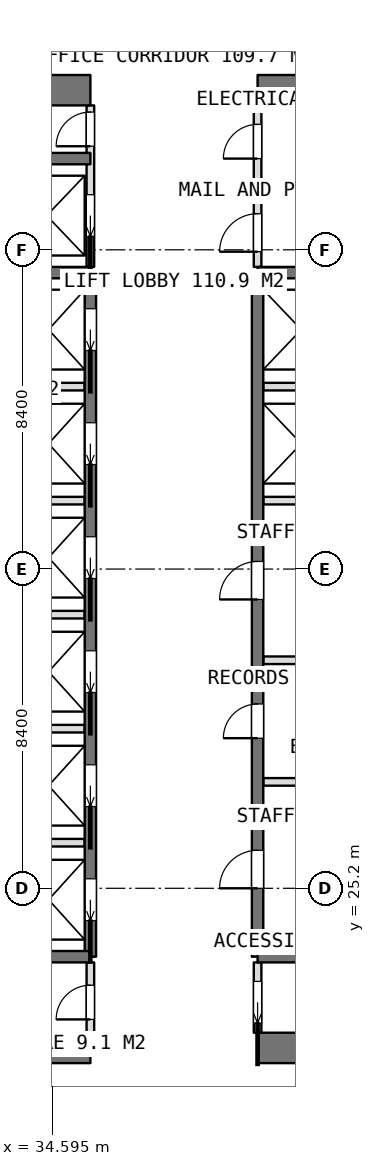
"""IFC4 building model, lengths in metres.
Left out: names, types, materials, properties, quantities, classifications, styles, units other than length and angle.
Written with IfcOpenShell. Run it as: python <this file> out.ifc"""

import sys

from ifc_helpers import new_model, si_unit, direction, frame, frame_2d, origin, place, context, subcontext, project, spatial, rectangle, extrude, element, fill, save


model = new_model("IFC4")
c1 = context("Model", 3, precision=1e-05, world=origin(), true_north=direction((0.0, 1.0)))
c2 = subcontext(c1, "Body", "Model", "MODEL_VIEW")
j1 = project(units=[si_unit("LENGTHUNIT", "METRE"), si_unit("PLANEANGLEUNIT", "RADIAN")], contexts=[c1])
p1 = place(None, origin())
s1 = spatial("IfcSite", under=j1, at=p1, CompositionType="ELEMENT")
p2 = place(p1, origin())
s2 = spatial("IfcBuilding", under=s1, at=p2, CompositionType="ELEMENT")
p3 = place(p2, frame((0.0, 0.0, 261.35)))
s3 = spatial("IfcBuildingStorey", under=s2, at=p3, CompositionType="ELEMENT", Elevation=261.35)
p4 = place(p3, frame((25.2, 21.0, 0.0), z_axis=(0.0, 0.0, 1.0), x_axis=(1.0, 0.0, 0.0)))
e1 = element("IfcWall", 1, at=p4, inside=s3, PredefinedType="SHEAR", context=c2, shape_type="SweptSolid", body=[
    extrude(rectangle(XDim=10.4, YDim=0.8, at=frame_2d((5.2, 0.0))), origin(), (0.0, 0.0, 1.0), 3.75),
])
p5 = place(p3, frame((40.0, 21.0, 0.0), z_axis=(0.0, 0.0, 1.0), x_axis=(1.0, 0.0, 0.0)))
e2 = element("IfcWall", 2, at=p5, inside=s3, PredefinedType="SHEAR", context=c2, shape_type="SweptSolid", body=[
    extrude(rectangle(XDim=10.4, YDim=0.8, at=frame_2d((5.2, 0.0))), origin(), (0.0, 0.0, 1.0), 3.75),
])
p6 = place(p3, frame((25.2, 46.2, 0.0), z_axis=(0.0, 0.0, 1.0), x_axis=(1.0, 0.0, 0.0)))
e3 = element("IfcWall", 3, at=p6, inside=s3, PredefinedType="SHEAR", context=c2, shape_type="SweptSolid", body=[
    extrude(rectangle(XDim=10.4, YDim=0.8, at=frame_2d((5.2, 0.0))), origin(), (0.0, 0.0, 1.0), 3.75),
])
p7 = place(p3, frame((40.0, 46.2, 0.0), z_axis=(0.0, 0.0, 1.0), x_axis=(1.0, 0.0, 0.0)))
e4 = element("IfcWall", 4, at=p7, inside=s3, PredefinedType="SHEAR", context=c2, shape_type="SweptSolid", body=[
    extrude(rectangle(XDim=10.4, YDim=0.8, at=frame_2d((5.2, 0.0))), origin(), (0.0, 0.0, 1.0), 3.75),
])
p8 = place(p3, frame((35.6, 23.4, 0.0), z_axis=(0.0, 0.0, 1.0), x_axis=(0.0, 1.0, 0.0)))
e5 = element("IfcWall", 5, at=p8, inside=s3, PredefinedType="SHEAR", context=c2, shape_type="SweptSolid", body=[
    extrude(rectangle(XDim=18.0, YDim=0.3, at=frame_2d((9.0, 0.0))), origin(), (0.0, 0.0, 1.0), 3.75),
])
p9 = place(p8, frame((0.95, 0.0, 0.0)))
e6 = element("IfcOpeningElement", 6, at=p9, cuts=e5, PredefinedType="OPENING", context=c2, shape_type="SweptSolid", body=[
    extrude(rectangle(XDim=1.1, YDim=2.1, at=frame_2d((0.55, 1.05))), frame((0.0, 0.16, 0.0), z_axis=(0.0, -1.0, 0.0), x_axis=(1.0, 0.0, 0.0)), (0.0, 0.0, 1.0), 0.32),
])
p10 = place(p8, frame((3.95, 0.0, 0.0)))
e7 = element("IfcOpeningElement", 7, at=p10, cuts=e5, PredefinedType="OPENING", context=c2, shape_type="SweptSolid", body=[
    extrude(rectangle(XDim=1.1, YDim=2.1, at=frame_2d((0.55, 1.05))), frame((0.0, 0.16, 0.0), z_axis=(0.0, -1.0, 0.0), x_axis=(1.0, 0.0, 0.0)), (0.0, 0.0, 1.0), 0.32),
])
p11 = place(p8, frame((6.95, 0.0, 0.0)))
e8 = element("IfcOpeningElement", 8, at=p11, cuts=e5, PredefinedType="OPENING", context=c2, shape_type="SweptSolid", body=[
    extrude(rectangle(XDim=1.1, YDim=2.1, at=frame_2d((0.55, 1.05))), frame((0.0, 0.16, 0.0), z_axis=(0.0, -1.0, 0.0), x_axis=(1.0, 0.0, 0.0)), (0.0, 0.0, 1.0), 0.32),
])
p12 = place(p8, frame((9.95, 0.0, 0.0)))
e9 = element("IfcOpeningElement", 9, at=p12, cuts=e5, PredefinedType="OPENING", context=c2, shape_type="SweptSolid", body=[
    extrude(rectangle(XDim=1.1, YDim=2.1, at=frame_2d((0.55, 1.05))), frame((0.0, 0.16, 0.0), z_axis=(0.0, -1.0, 0.0), x_axis=(1.0, 0.0, 0.0)), (0.0, 0.0, 1.0), 0.32),
])
p13 = place(p8, frame((12.95, 0.0, 0.0)))
e10 = element("IfcOpeningElement", 10, at=p13, cuts=e5, PredefinedType="OPENING", context=c2, shape_type="SweptSolid", body=[
    extrude(rectangle(XDim=1.1, YDim=2.1, at=frame_2d((0.55, 1.05))), frame((0.0, 0.16, 0.0), z_axis=(0.0, -1.0, 0.0), x_axis=(1.0, 0.0, 0.0)), (0.0, 0.0, 1.0), 0.32),
])
p14 = place(p8, frame((15.95, 0.0, 0.0)))
e11 = element("IfcOpeningElement", 11, at=p14, cuts=e5, PredefinedType="OPENING", context=c2, shape_type="SweptSolid", body=[
    extrude(rectangle(XDim=1.1, YDim=2.1, at=frame_2d((0.55, 1.05))), frame((0.0, 0.16, 0.0), z_axis=(0.0, -1.0, 0.0), x_axis=(1.0, 0.0, 0.0)), (0.0, 0.0, 1.0), 0.32),
])
p15 = place(p3, frame((40.0, 23.4, 0.0), z_axis=(0.0, 0.0, 1.0), x_axis=(0.0, 1.0, 0.0)))
e12 = element("IfcWall", 12, at=p15, inside=s3, PredefinedType="SHEAR", context=c2, shape_type="SweptSolid", body=[
    extrude(rectangle(XDim=18.0, YDim=0.3, at=frame_2d((9.0, 0.0))), origin(), (0.0, 0.0, 1.0), 3.75),
])
p16 = place(p15, frame((1.8, 0.0, 0.0)))
e13 = element("IfcOpeningElement", 13, at=p16, cuts=e12, PredefinedType="OPENING", context=c2, shape_type="SweptSolid", body=[
    extrude(rectangle(XDim=1.0, YDim=2.1, at=frame_2d((0.5, 1.05))), frame((0.0, 0.16, 0.0), z_axis=(0.0, -1.0, 0.0), x_axis=(1.0, 0.0, 0.0)), (0.0, 0.0, 1.0), 0.32),
])
p17 = place(p15, frame((5.75, 0.0, 0.0)))
e14 = element("IfcOpeningElement", 14, at=p17, cuts=e12, PredefinedType="OPENING", context=c2, shape_type="SweptSolid", body=[
    extrude(rectangle(XDim=0.9, YDim=2.1, at=frame_2d((0.45, 1.05))), frame((0.0, 0.16, 0.0), z_axis=(0.0, -1.0, 0.0), x_axis=(1.0, 0.0, 0.0)), (0.0, 0.0, 1.0), 0.32),
])
p18 = place(p15, frame((9.4, 0.0, 0.0)))
e15 = element("IfcOpeningElement", 15, at=p18, cuts=e12, PredefinedType="OPENING", context=c2, shape_type="SweptSolid", body=[
    extrude(rectangle(XDim=1.0, YDim=2.1, at=frame_2d((0.5, 1.05))), frame((0.0, 0.16, 0.0), z_axis=(0.0, -1.0, 0.0), x_axis=(1.0, 0.0, 0.0)), (0.0, 0.0, 1.0), 0.32),
])
for number, where, z_axis, x_axis in (
    (16, (31.8, 23.4, 0.0), (0.0, 0.0, 1.0), (1.0, 0.0, 0.0)),
    (17, (31.8, 41.4, 0.0), (0.0, 0.0, 1.0), (1.0, 0.0, 0.0)),
    (18, (31.8, 44.4, 0.0), (0.0, 0.0, 1.0), (1.0, 0.0, 0.0)),
    (19, (40.0, 23.4, 0.0), (0.0, 0.0, 1.0), (1.0, 0.0, 0.0)),
    (20, (40.0, 41.4, 0.0), (0.0, 0.0, 1.0), (1.0, 0.0, 0.0)),
):
    element("IfcWall", number, at=place(p3, frame(where, z_axis=z_axis, x_axis=x_axis)), inside=s3, PredefinedType="SHEAR", context=c2, shape_type="SweptSolid", body=[
        extrude(rectangle(XDim=3.8, YDim=0.3, at=frame_2d((1.9, 0.0))), origin(), (0.0, 0.0, 1.0), 3.75),
    ])
for number, where, z_axis, x_axis in (
    (21, (31.95, 26.4, 0.0), (0.0, 0.0, 1.0), (1.0, 0.0, 0.0)),
    (22, (31.95, 29.4, 0.0), (0.0, 0.0, 1.0), (1.0, 0.0, 0.0)),
    (23, (31.95, 32.4, 0.0), (0.0, 0.0, 1.0), (1.0, 0.0, 0.0)),
    (24, (31.95, 35.4, 0.0), (0.0, 0.0, 1.0), (1.0, 0.0, 0.0)),
    (25, (31.95, 38.4, 0.0), (0.0, 0.0, 1.0), (1.0, 0.0, 0.0)),
    (26, (40.15, 35.4, 0.0), (0.0, 0.0, 1.0), (1.0, 0.0, 0.0)),
    (27, (40.15, 38.4, 0.0), (0.0, 0.0, 1.0), (1.0, 0.0, 0.0)),
):
    element("IfcWall", number, at=place(p3, frame(where, z_axis=z_axis, x_axis=x_axis)), inside=s3, PredefinedType="PARTITIONING", context=c2, shape_type="SweptSolid", body=[
        extrude(rectangle(XDim=3.5, YDim=0.2, at=frame_2d((1.75, 0.0))), origin(), (0.0, 0.0, 1.0), 3.5),
    ])
p19 = place(p3, frame((40.0, 21.4, 0.0), z_axis=(0.0, 0.0, 1.0), x_axis=(0.0, 1.0, 0.0)))
e28 = element("IfcWall", 28, at=p19, inside=s3, PredefinedType="PARTITIONING", context=c2, shape_type="SweptSolid", body=[
    extrude(rectangle(XDim=1.85, YDim=0.2, at=frame_2d((0.925, 0.0))), origin(), (0.0, 0.0, 1.0), 3.5),
])
p20 = place(p19, frame((0.25, 0.0, 0.0)))
e29 = element("IfcOpeningElement", 29, at=p20, cuts=e28, PredefinedType="OPENING", context=c2, shape_type="SweptSolid", body=[
    extrude(rectangle(XDim=1.1, YDim=2.1, at=frame_2d((0.55, 1.05))), frame((0.0, 0.11, 0.0), z_axis=(0.0, -1.0, 0.0), x_axis=(1.0, 0.0, 0.0)), (0.0, 0.0, 1.0), 0.22),
])
p21 = place(p3, frame((40.0, 41.55, 0.0), z_axis=(0.0, 0.0, 1.0), x_axis=(0.0, 1.0, 0.0)))
e30 = element("IfcWall", 30, at=p21, inside=s3, PredefinedType="PARTITIONING", context=c2, shape_type="SweptSolid", body=[
    extrude(rectangle(XDim=4.25, YDim=0.2, at=frame_2d((2.125, 0.0))), origin(), (0.0, 0.0, 1.0), 3.5),
])
p22 = place(p21, frame((2.85, 0.0, 0.0)))
e31 = element("IfcOpeningElement", 31, at=p22, cuts=e30, PredefinedType="OPENING", context=c2, shape_type="SweptSolid", body=[
    extrude(rectangle(XDim=0.9, YDim=2.1, at=frame_2d((0.45, 1.05))), frame((0.0, 0.11, 0.0), z_axis=(0.0, -1.0, 0.0), x_axis=(1.0, 0.0, 0.0)), (0.0, 0.0, 1.0), 0.22),
])
p23 = place(p21, frame((0.4, 0.0, 0.0)))
e32 = element("IfcOpeningElement", 32, at=p23, cuts=e30, PredefinedType="OPENING", context=c2, shape_type="SweptSolid", body=[
    extrude(rectangle(XDim=1.0, YDim=2.1, at=frame_2d((0.5, 1.05))), frame((0.0, 0.11, 0.0), z_axis=(0.0, -1.0, 0.0), x_axis=(1.0, 0.0, 0.0)), (0.0, 0.0, 1.0), 0.22),
])
p24 = place(p3, frame((35.6, 41.55, 0.0), z_axis=(0.0, 0.0, 1.0), x_axis=(0.0, 1.0, 0.0)))
e33 = element("IfcWall", 33, at=p24, inside=s3, PredefinedType="PARTITIONING", context=c2, shape_type="SweptSolid", body=[
    extrude(rectangle(XDim=4.25, YDim=0.2, at=frame_2d((2.125, 0.0))), origin(), (0.0, 0.0, 1.0), 3.5),
])
p25 = place(p24, frame((3.175, 0.0, 0.0)))
e34 = element("IfcOpeningElement", 34, at=p25, cuts=e33, PredefinedType="OPENING", context=c2, shape_type="SweptSolid", body=[
    extrude(rectangle(XDim=0.9, YDim=2.1, at=frame_2d((0.45, 1.05))), frame((0.0, 0.11, 0.0), z_axis=(0.0, -1.0, 0.0), x_axis=(1.0, 0.0, 0.0)), (0.0, 0.0, 1.0), 0.22),
])
p26 = place(p24, frame((0.8, 0.0, 0.0)))
e35 = element("IfcOpeningElement", 35, at=p26, cuts=e33, PredefinedType="OPENING", context=c2, shape_type="SweptSolid", body=[
    extrude(rectangle(XDim=1.1, YDim=2.1, at=frame_2d((0.55, 1.05))), frame((0.0, 0.11, 0.0), z_axis=(0.0, -1.0, 0.0), x_axis=(1.0, 0.0, 0.0)), (0.0, 0.0, 1.0), 0.22),
])
p27 = place(p3, frame((35.6, 21.4, 0.0), z_axis=(0.0, 0.0, 1.0), x_axis=(0.0, 1.0, 0.0)))
e36 = element("IfcWall", 36, at=p27, inside=s3, PredefinedType="PARTITIONING", context=c2, shape_type="SweptSolid", body=[
    extrude(rectangle(XDim=1.85, YDim=0.2, at=frame_2d((0.925, 0.0))), origin(), (0.0, 0.0, 1.0), 3.5),
])
p28 = place(p27, frame((0.35, 0.0, 0.0)))
e37 = element("IfcOpeningElement", 37, at=p28, cuts=e36, PredefinedType="OPENING", context=c2, shape_type="SweptSolid", body=[
    extrude(rectangle(XDim=0.9, YDim=2.1, at=frame_2d((0.45, 1.05))), frame((0.0, 0.11, 0.0), z_axis=(0.0, -1.0, 0.0), x_axis=(1.0, 0.0, 0.0)), (0.0, 0.0, 1.0), 0.22),
])
for number, where, z_axis, x_axis in (
    (38, (40.15, 28.0, 0.0), (0.0, 0.0, 1.0), (1.0, 0.0, 0.0)),
    (39, (40.15, 31.2, 0.0), (0.0, 0.0, 1.0), (1.0, 0.0, 0.0)),
):
    element("IfcWall", number, at=place(p3, frame(where, z_axis=z_axis, x_axis=x_axis)), inside=s3, PredefinedType="PARTITIONING", context=c2, shape_type="SweptSolid", body=[
        extrude(rectangle(XDim=3.5, YDim=0.2, at=frame_2d((1.75, 0.0))), origin(), (0.0, 0.0, 1.0), 3.5),
    ])
p29 = place(p3, frame((40.0, 43.5, 0.0), z_axis=(0.0, 0.0, 1.0), x_axis=(1.0, 0.0, 0.0)))
e40 = element("IfcWall", 40, at=p29, inside=s3, PredefinedType="PARTITIONING", context=c2, shape_type="SweptSolid", body=[
    extrude(rectangle(XDim=3.65, YDim=0.2, at=frame_2d((1.825, 0.0))), origin(), (0.0, 0.0, 1.0), 3.5),
])
p30 = place(p20, origin())
e41 = element("IfcDoor", 41, at=p30, inside=s3, OperationType="SLIDING_TO_LEFT", PredefinedType="DOOR", context=c2, shape_type="SweptSolid", body=[
    extrude(rectangle(XDim=1.1, YDim=2.1, at=frame_2d((0.55, 1.05))), frame((0.0, 0.025, 0.0), z_axis=(0.0, -1.0, 0.0), x_axis=(1.0, 0.0, 0.0)), (0.0, 0.0, 1.0), 0.05),
])
fill(e29, e41)
p31 = place(p28, origin())
e42 = element("IfcDoor", 42, at=p31, inside=s3, OperationType="SINGLE_SWING_LEFT", PredefinedType="DOOR", context=c2, shape_type="SweptSolid", body=[
    extrude(rectangle(XDim=0.9, YDim=2.1, at=frame_2d((0.45, 1.05))), frame((0.0, 0.025, 0.0), z_axis=(0.0, -1.0, 0.0), x_axis=(1.0, 0.0, 0.0)), (0.0, 0.0, 1.0), 0.05),
])
fill(e37, e42)
p32 = place(p22, origin())
e43 = element("IfcDoor", 43, at=p32, inside=s3, OperationType="SINGLE_SWING_LEFT", PredefinedType="DOOR", context=c2, shape_type="SweptSolid", body=[
    extrude(rectangle(XDim=0.9, YDim=2.1, at=frame_2d((0.45, 1.05))), frame((0.0, 0.025, 0.0), z_axis=(0.0, -1.0, 0.0), x_axis=(1.0, 0.0, 0.0)), (0.0, 0.0, 1.0), 0.05),
])
fill(e31, e43)
p33 = place(p23, origin())
e44 = element("IfcDoor", 44, at=p33, inside=s3, OperationType="SINGLE_SWING_LEFT", PredefinedType="DOOR", context=c2, shape_type="SweptSolid", body=[
    extrude(rectangle(XDim=1.0, YDim=2.1, at=frame_2d((0.5, 1.05))), frame((0.0, 0.025, 0.0), z_axis=(0.0, -1.0, 0.0), x_axis=(1.0, 0.0, 0.0)), (0.0, 0.0, 1.0), 0.05),
])
fill(e32, e44)
p34 = place(p16, origin())
e45 = element("IfcDoor", 45, at=p34, inside=s3, OperationType="SINGLE_SWING_LEFT", PredefinedType="DOOR", context=c2, shape_type="SweptSolid", body=[
    extrude(rectangle(XDim=1.0, YDim=2.1, at=frame_2d((0.5, 1.05))), frame((0.0, 0.025, 0.0), z_axis=(0.0, -1.0, 0.0), x_axis=(1.0, 0.0, 0.0)), (0.0, 0.0, 1.0), 0.05),
])
fill(e13, e45)
p35 = place(p17, origin())
e46 = element("IfcDoor", 46, at=p35, inside=s3, OperationType="SINGLE_SWING_LEFT", PredefinedType="DOOR", context=c2, shape_type="SweptSolid", body=[
    extrude(rectangle(XDim=0.9, YDim=2.1, at=frame_2d((0.45, 1.05))), frame((0.0, 0.025, 0.0), z_axis=(0.0, -1.0, 0.0), x_axis=(1.0, 0.0, 0.0)), (0.0, 0.0, 1.0), 0.05),
])
fill(e14, e46)
p36 = place(p18, origin())
e47 = element("IfcDoor", 47, at=p36, inside=s3, OperationType="SINGLE_SWING_LEFT", PredefinedType="DOOR", context=c2, shape_type="SweptSolid", body=[
    extrude(rectangle(XDim=1.0, YDim=2.1, at=frame_2d((0.5, 1.05))), frame((0.0, 0.025, 0.0), z_axis=(0.0, -1.0, 0.0), x_axis=(1.0, 0.0, 0.0)), (0.0, 0.0, 1.0), 0.05),
])
fill(e15, e47)
p37 = place(p25, origin())
e48 = element("IfcDoor", 48, at=p37, inside=s3, OperationType="SINGLE_SWING_LEFT", PredefinedType="DOOR", context=c2, shape_type="SweptSolid", body=[
    extrude(rectangle(XDim=0.9, YDim=2.1, at=frame_2d((0.45, 1.05))), frame((0.0, 0.025, 0.0), z_axis=(0.0, -1.0, 0.0), x_axis=(1.0, 0.0, 0.0)), (0.0, 0.0, 1.0), 0.05),
])
fill(e34, e48)
p38 = place(p9, origin())
e49 = element("IfcDoor", 49, at=p38, inside=s3, OperationType="SLIDING_TO_LEFT", PredefinedType="USERDEFINED", context=c2, shape_type="SweptSolid", body=[
    extrude(rectangle(XDim=1.1, YDim=2.1, at=frame_2d((0.55, 1.05))), frame((0.0, 0.025, 0.0), z_axis=(0.0, -1.0, 0.0), x_axis=(1.0, 0.0, 0.0)), (0.0, 0.0, 1.0), 0.05),
])
fill(e6, e49)
p39 = place(p10, origin())
e50 = element("IfcDoor", 50, at=p39, inside=s3, OperationType="SLIDING_TO_LEFT", PredefinedType="USERDEFINED", context=c2, shape_type="SweptSolid", body=[
    extrude(rectangle(XDim=1.1, YDim=2.1, at=frame_2d((0.55, 1.05))), frame((0.0, 0.025, 0.0), z_axis=(0.0, -1.0, 0.0), x_axis=(1.0, 0.0, 0.0)), (0.0, 0.0, 1.0), 0.05),
])
fill(e7, e50)
p40 = place(p11, origin())
e51 = element("IfcDoor", 51, at=p40, inside=s3, OperationType="SLIDING_TO_LEFT", PredefinedType="USERDEFINED", context=c2, shape_type="SweptSolid", body=[
    extrude(rectangle(XDim=1.1, YDim=2.1, at=frame_2d((0.55, 1.05))), frame((0.0, 0.025, 0.0), z_axis=(0.0, -1.0, 0.0), x_axis=(1.0, 0.0, 0.0)), (0.0, 0.0, 1.0), 0.05),
])
fill(e8, e51)
p41 = place(p12, origin())
e52 = element("IfcDoor", 52, at=p41, inside=s3, OperationType="SLIDING_TO_LEFT", PredefinedType="USERDEFINED", context=c2, shape_type="SweptSolid", body=[
    extrude(rectangle(XDim=1.1, YDim=2.1, at=frame_2d((0.55, 1.05))), frame((0.0, 0.025, 0.0), z_axis=(0.0, -1.0, 0.0), x_axis=(1.0, 0.0, 0.0)), (0.0, 0.0, 1.0), 0.05),
])
fill(e9, e52)
p42 = place(p13, origin())
e53 = element("IfcDoor", 53, at=p42, inside=s3, OperationType="SLIDING_TO_LEFT", PredefinedType="USERDEFINED", context=c2, shape_type="SweptSolid", body=[
    extrude(rectangle(XDim=1.1, YDim=2.1, at=frame_2d((0.55, 1.05))), frame((0.0, 0.025, 0.0), z_axis=(0.0, -1.0, 0.0), x_axis=(1.0, 0.0, 0.0)), (0.0, 0.0, 1.0), 0.05),
])
fill(e10, e53)
p43 = place(p14, origin())
e54 = element("IfcDoor", 54, at=p43, inside=s3, OperationType="SLIDING_TO_LEFT", PredefinedType="USERDEFINED", context=c2, shape_type="SweptSolid", body=[
    extrude(rectangle(XDim=1.1, YDim=2.1, at=frame_2d((0.55, 1.05))), frame((0.0, 0.025, 0.0), z_axis=(0.0, -1.0, 0.0), x_axis=(1.0, 0.0, 0.0)), (0.0, 0.0, 1.0), 0.05),
])
fill(e11, e54)
p44 = place(p26, origin())
e55 = element("IfcDoor", 55, at=p44, inside=s3, OperationType="SLIDING_TO_LEFT", PredefinedType="USERDEFINED", context=c2, shape_type="SweptSolid", body=[
    extrude(rectangle(XDim=1.1, YDim=2.1, at=frame_2d((0.55, 1.05))), frame((0.0, 0.025, 0.0), z_axis=(0.0, -1.0, 0.0), x_axis=(1.0, 0.0, 0.0)), (0.0, 0.0, 1.0), 0.05),
])
fill(e35, e55)
save(model, sys.argv[1])
